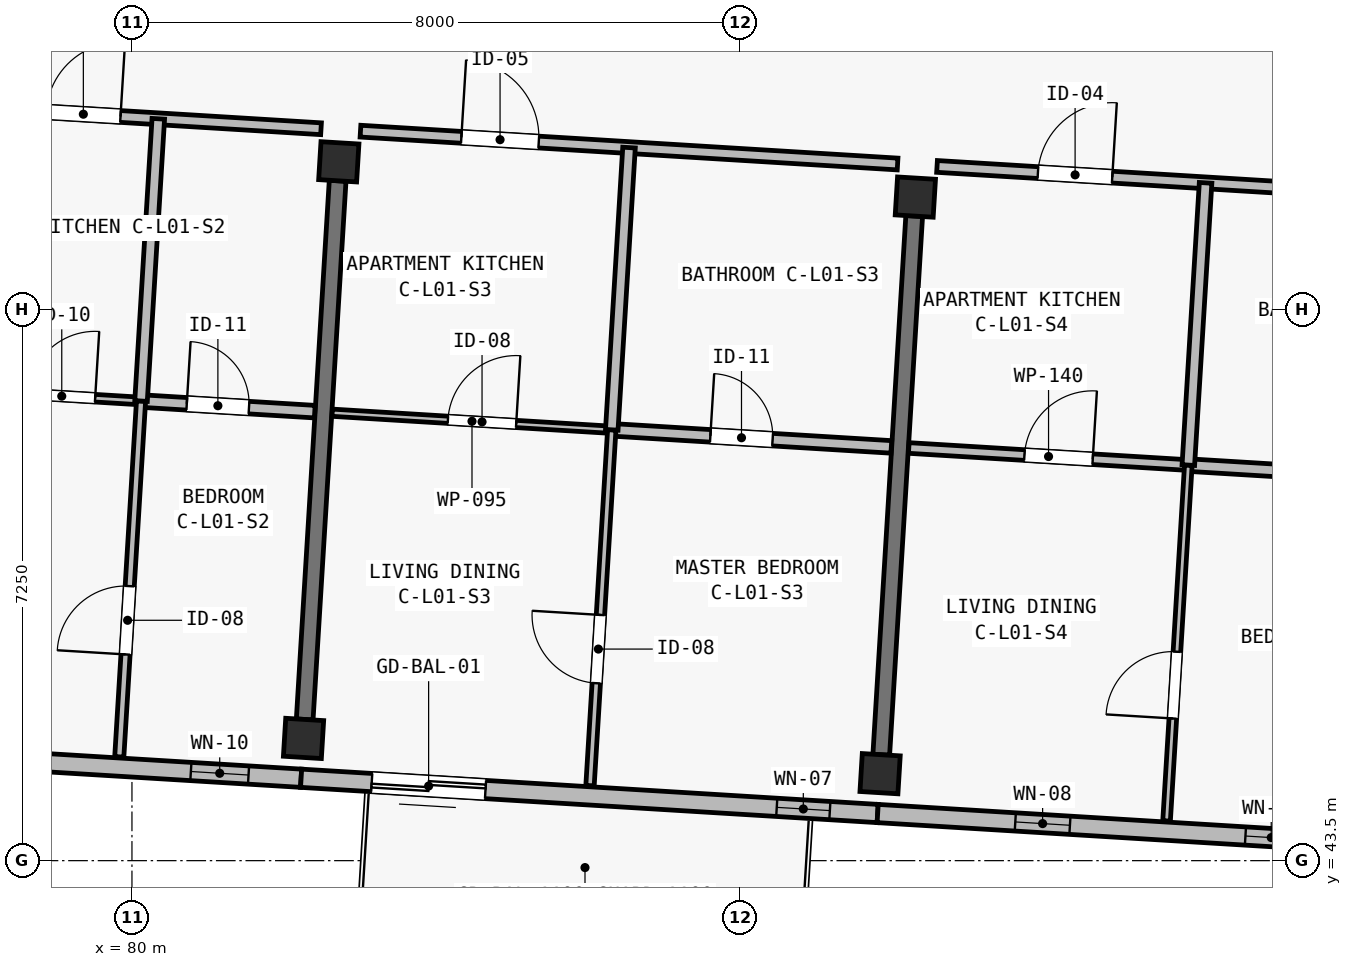
"""IFC4 building model, lengths in metres.
Left out: names, types, materials, properties, quantities, classifications, styles, units other than length and angle.
Written with IfcOpenShell. Run it as: python <this file> out.ifc"""

import sys

from ifc_helpers import new_model, si_unit, direction, frame, frame_2d, origin, origin_2d, place, context, subcontext, project, spatial, rectangle, extrude, element, fill, save


model = new_model("IFC4")
c1 = context("Model", 3, precision=1e-05, world=origin(), true_north=direction((0.0, 1.0)))
c2 = subcontext(c1, "Body", "Model", "MODEL_VIEW")
j1 = project(units=[si_unit("LENGTHUNIT", "METRE"), si_unit("PLANEANGLEUNIT", "RADIAN")], contexts=[c1])
p1 = place(None, origin())
s1 = spatial("IfcSite", under=j1, at=p1, CompositionType="ELEMENT")
p2 = place(p1, origin())
s2 = spatial("IfcBuilding", under=s1, at=p2, CompositionType="ELEMENT")
p3 = place(p2, frame((0.0, 0.0, 4.5)))
s3 = spatial("IfcBuildingStorey", under=s2, at=p3, CompositionType="ELEMENT", Elevation=4.5)
for number, where, z_axis, x_axis in (
    (1, (82.258, 45.108, 0.0), (0.0, 0.0, 1.0), (0.998, -0.061, 0.0)),
    (2, (82.721, 52.694, 0.0), (0.0, 0.0, 1.0), (0.998, -0.061, 0.0)),
    (3, (89.843, 44.644, 0.0), (0.0, 0.0, 1.0), (0.998, -0.061, 0.0)),
    (4, (90.307, 52.23, 0.0), (0.0, 0.0, 1.0), (0.998, -0.061, 0.0)),
):
    element("IfcColumn", number, at=place(p3, frame(where, z_axis=z_axis, x_axis=x_axis)), inside=s3, PredefinedType="COLUMN", context=c2, shape_type="SweptSolid", body=[
        extrude(rectangle(XDim=0.5, YDim=0.5, at=origin_2d()), origin(), (0.0, 0.0, 1.0), 3.9),
    ])
p4 = place(p3, frame((82.273, 45.358, -0.25), z_axis=(0.0, 0.0, 1.0), x_axis=(0.061070212127, 0.998133472633, 0.0)))
e5 = element("IfcWall", 5, at=p4, inside=s3, PredefinedType="SHEAR", context=c2, shape_type="SweptSolid", body=[
    extrude(rectangle(XDim=7.1, YDim=0.22, at=frame_2d((3.55, 0.0))), origin(), (0.0, 0.0, 1.0), 3.4),
])
p5 = place(p3, frame((89.859, 44.894, -0.25), z_axis=(0.0, 0.0, 1.0), x_axis=(0.061033859059, 0.99813569621, 0.0)))
e6 = element("IfcWall", 6, at=p5, inside=s3, PredefinedType="SHEAR", context=c2, shape_type="SweptSolid", body=[
    extrude(rectangle(XDim=7.1, YDim=0.22, at=frame_2d((3.55, 0.0))), origin(), (0.0, 0.0, 1.0), 3.4),
])
p6 = place(p3, frame((82.225, 44.584, 0.0), z_axis=(0.0, 0.0, 1.0), x_axis=(-0.998133591969, 0.061068261669, 0.0)))
e7 = element("IfcWall", 7, at=p6, inside=s3, PredefinedType="SOLIDWALL", context=c2, shape_type="SweptSolid", body=[
    extrude(rectangle(XDim=7.6, YDim=0.24, at=frame_2d((3.8, 0.0))), origin(), (0.0, 0.0, 1.0), 3.65),
])
p7 = place(p6, frame((0.693, 0.0, 0.42)))
e8 = element("IfcOpeningElement", 8, at=p7, cuts=e7, PredefinedType="OPENING", context=c2, shape_type="SweptSolid", body=[
    extrude(rectangle(XDim=0.76, YDim=2.34, at=frame_2d((0.38, 1.17))), frame((0.0, 0.135, 0.0), z_axis=(0.0, -1.0, 0.0), x_axis=(1.0, 0.0, 0.0)), (0.0, 0.0, 1.0), 0.27),
])
p8 = place(p6, frame((3.476, 0.0, 0.42)))
e9 = element("IfcOpeningElement", 9, at=p8, cuts=e7, PredefinedType="OPENING", context=c2, shape_type="SweptSolid", body=[
    extrude(rectangle(XDim=0.82, YDim=2.18, at=frame_2d((0.41, 1.09))), frame((0.0, 0.135, 0.0), z_axis=(0.0, -1.0, 0.0), x_axis=(1.0, 0.0, 0.0)), (0.0, 0.0, 1.0), 0.27),
])
p9 = place(p3, frame((89.811, 44.12, 0.0), z_axis=(0.0, 0.0, 1.0), x_axis=(-0.998135669243, 0.061034300063, 0.0)))
e10 = element("IfcWall", 10, at=p9, inside=s3, PredefinedType="SOLIDWALL", context=c2, shape_type="SweptSolid", body=[
    extrude(rectangle(XDim=7.6, YDim=0.24, at=frame_2d((3.8, 0.0))), origin(), (0.0, 0.0, 1.0), 3.65),
])
p10 = place(p9, frame((5.169, 0.0, 0.0)))
e11 = element("IfcOpeningElement", 11, at=p10, cuts=e10, PredefinedType="OPENING", context=c2, shape_type="SweptSolid", body=[
    extrude(rectangle(XDim=1.5, YDim=2.12, at=frame_2d((0.75, 1.06))), frame((0.0, 0.135, 0.0), z_axis=(0.0, -1.0, 0.0), x_axis=(1.0, 0.0, 0.0)), (0.0, 0.0, 1.0), 0.27),
])
p11 = place(p9, frame((0.63, 0.0, 0.46)))
e12 = element("IfcOpeningElement", 12, at=p11, cuts=e10, PredefinedType="OPENING", context=c2, shape_type="SweptSolid", body=[
    extrude(rectangle(XDim=0.7, YDim=2.36, at=frame_2d((0.35, 1.18))), frame((0.0, 0.135, 0.0), z_axis=(0.0, -1.0, 0.0), x_axis=(1.0, 0.0, 0.0)), (0.0, 0.0, 1.0), 0.27),
])
p12 = place(p3, frame((97.397, 43.656, 0.0), z_axis=(0.0, 0.0, 1.0), x_axis=(-0.998135549572, 0.061036257095, 0.0)))
e13 = element("IfcWall", 13, at=p12, inside=s3, PredefinedType="SOLIDWALL", context=c2, shape_type="SweptSolid", body=[
    extrude(rectangle(XDim=7.6, YDim=0.24, at=frame_2d((3.8, 0.0))), origin(), (0.0, 0.0, 1.0), 3.65),
])
p13 = place(p12, frame((0.61, 0.0, 0.52)))
e14 = element("IfcOpeningElement", 14, at=p13, cuts=e13, PredefinedType="OPENING", context=c2, shape_type="SweptSolid", body=[
    extrude(rectangle(XDim=0.66, YDim=2.32, at=frame_2d((0.33, 1.16))), frame((0.0, 0.135, 0.0), z_axis=(0.0, -1.0, 0.0), x_axis=(1.0, 0.0, 0.0)), (0.0, 0.0, 1.0), 0.27),
])
p14 = place(p12, frame((2.072, 0.0, 0.42)))
e15 = element("IfcOpeningElement", 15, at=p14, cuts=e13, PredefinedType="OPENING", context=c2, shape_type="SweptSolid", body=[
    extrude(rectangle(XDim=0.68, YDim=2.24, at=frame_2d((0.34, 1.12))), frame((0.0, 0.135, 0.0), z_axis=(0.0, -1.0, 0.0), x_axis=(1.0, 0.0, 0.0)), (0.0, 0.0, 1.0), 0.27),
])
p15 = place(p12, frame((5.066, 0.0, 0.52)))
e16 = element("IfcOpeningElement", 16, at=p15, cuts=e13, PredefinedType="OPENING", context=c2, shape_type="SweptSolid", body=[
    extrude(rectangle(XDim=0.72, YDim=2.16, at=frame_2d((0.36, 1.08))), frame((0.0, 0.135, 0.0), z_axis=(0.0, -1.0, 0.0), x_axis=(1.0, 0.0, 0.0)), (0.0, 0.0, 1.0), 0.27),
])
p16 = place(p3, frame((78.415, 53.378, 0.0), z_axis=(0.0, 0.0, 1.0), x_axis=(0.998131852862, -0.061096679962, 0.0)))
e17 = element("IfcWall", 17, at=p16, inside=s3, PredefinedType="PARTITIONING", context=c2, shape_type="SweptSolid", body=[
    extrude(rectangle(XDim=4.08, YDim=0.155, at=frame_2d((2.04, 0.0))), origin(), (0.0, 0.0, 1.0), 3.62),
])
p17 = place(p16, frame((0.457, 0.0, 0.0)))
e18 = element("IfcOpeningElement", 18, at=p17, cuts=e17, PredefinedType="OPENING", context=c2, shape_type="SweptSolid", body=[
    extrude(rectangle(XDim=0.98, YDim=2.15, at=frame_2d((0.49, 1.075))), frame((0.0, 0.093, 0.0), z_axis=(0.0, -1.0, 0.0), x_axis=(1.0, 0.0, 0.0)), (0.0, 0.0, 1.0), 0.185),
])
p18 = place(p3, frame((75.049, 49.857, 0.0), z_axis=(0.0, 0.0, 1.0), x_axis=(0.998135637207, -0.061034823981, 0.0)))
e19 = element("IfcWall", 19, at=p18, inside=s3, PredefinedType="PARTITIONING", context=c2, shape_type="SweptSolid", body=[
    extrude(rectangle(XDim=5.08, YDim=0.1, at=frame_2d((2.54, 0.0))), origin(), (0.0, 0.0, 1.0), 3.62),
])
p19 = place(p18, frame((3.595, 0.0, 0.0)))
e20 = element("IfcOpeningElement", 20, at=p19, cuts=e19, PredefinedType="OPENING", context=c2, shape_type="SweptSolid", body=[
    extrude(rectangle(XDim=0.88, YDim=2.1, at=frame_2d((0.44, 1.05))), frame((0.0, 0.065, 0.0), z_axis=(0.0, -1.0, 0.0), x_axis=(1.0, 0.0, 0.0)), (0.0, 0.0, 1.0), 0.13),
])
p20 = place(p3, frame((80.119, 49.547, 0.0), z_axis=(0.0, 0.0, 1.0), x_axis=(0.99813262565, -0.061084053668, 0.0)))
e21 = element("IfcWall", 21, at=p20, inside=s3, PredefinedType="PLUMBINGWALL", context=c2, shape_type="SweptSolid", body=[
    extrude(rectangle(XDim=2.29, YDim=0.165, at=frame_2d((1.145, 0.0))), origin(), (0.0, 0.0, 1.0), 3.62),
])
p21 = place(p20, frame((0.603, 0.0, 0.0)))
e22 = element("IfcOpeningElement", 22, at=p21, cuts=e21, PredefinedType="OPENING", context=c2, shape_type="SweptSolid", body=[
    extrude(rectangle(XDim=0.82, YDim=2.08, at=frame_2d((0.41, 1.04))), frame((0.0, 0.097, 0.0), z_axis=(0.0, -1.0, 0.0), x_axis=(1.0, 0.0, 0.0)), (0.0, 0.0, 1.0), 0.195),
])
p22 = place(p3, frame((79.833, 44.866, 0.0), z_axis=(0.0, 0.0, 1.0), x_axis=(0.061010571843, 0.998137119901, 0.0)))
e23 = element("IfcWall", 23, at=p22, inside=s3, PredefinedType="PARTITIONING", context=c2, shape_type="SweptSolid", body=[
    extrude(rectangle(XDim=4.69, YDim=0.12, at=frame_2d((2.345, 0.0))), origin(), (0.0, 0.0, 1.0), 3.62),
])
p23 = place(p22, frame((1.35, 0.0, 0.0)))
e24 = element("IfcOpeningElement", 24, at=p23, cuts=e23, PredefinedType="OPENING", context=c2, shape_type="SweptSolid", body=[
    extrude(rectangle(XDim=0.9, YDim=2.1, at=frame_2d((0.45, 1.05))), frame((0.0, 0.075, 0.0), z_axis=(0.0, -1.0, 0.0), x_axis=(1.0, 0.0, 0.0)), (0.0, 0.0, 1.0), 0.15),
])
p24 = place(p3, frame((80.119, 49.547, 0.0), z_axis=(0.0, 0.0, 1.0), x_axis=(0.061099388563, 0.998131687062, 0.0)))
e25 = element("IfcWall", 25, at=p24, inside=s3, PredefinedType="PLUMBINGWALL", context=c2, shape_type="SweptSolid", body=[
    extrude(rectangle(XDim=3.72, YDim=0.165, at=frame_2d((1.86, 0.0))), origin(), (0.0, 0.0, 1.0), 3.62),
])
p25 = place(p3, frame((83.007, 53.097, 0.0), z_axis=(0.0, 0.0, 1.0), x_axis=(0.998135666539, -0.061034344288, 0.0)))
e26 = element("IfcWall", 26, at=p25, inside=s3, PredefinedType="PARTITIONING", context=c2, shape_type="SweptSolid", body=[
    extrude(rectangle(XDim=7.08, YDim=0.155, at=frame_2d((3.54, 0.0))), origin(), (0.0, 0.0, 1.0), 3.62),
])
p26 = place(p25, frame((1.33, 0.0, 0.0)))
e27 = element("IfcOpeningElement", 27, at=p26, cuts=e26, PredefinedType="OPENING", context=c2, shape_type="SweptSolid", body=[
    extrude(rectangle(XDim=1.02, YDim=2.2, at=frame_2d((0.51, 1.1))), frame((0.0, 0.093, 0.0), z_axis=(0.0, -1.0, 0.0), x_axis=(1.0, 0.0, 0.0)), (0.0, 0.0, 1.0), 0.185),
])
p27 = place(p3, frame((82.635, 49.393, 0.0), z_axis=(0.0, 0.0, 1.0), x_axis=(0.998132682596, -0.061083123148, 0.0)))
e28 = element("IfcWall", 28, at=p27, inside=s3, PredefinedType="PARTITIONING", context=c2, shape_type="SweptSolid", body=[
    extrude(rectangle(XDim=3.685, YDim=0.095, at=frame_2d((1.843, 0.0))), origin(), (0.0, 0.0, 1.0), 3.62),
])
p28 = place(p27, frame((1.525, 0.0, 0.0)))
e29 = element("IfcOpeningElement", 29, at=p28, cuts=e28, PredefinedType="OPENING", context=c2, shape_type="SweptSolid", body=[
    extrude(rectangle(XDim=0.9, YDim=2.1, at=frame_2d((0.45, 1.05))), frame((0.0, 0.062, 0.0), z_axis=(0.0, -1.0, 0.0), x_axis=(1.0, 0.0, 0.0)), (0.0, 0.0, 1.0), 0.125),
])
p29 = place(p3, frame((86.313, 49.168, 0.0), z_axis=(0.0, 0.0, 1.0), x_axis=(0.998136472989, -0.061021154439, 0.0)))
e30 = element("IfcWall", 30, at=p29, inside=s3, PredefinedType="PLUMBINGWALL", context=c2, shape_type="SweptSolid", body=[
    extrude(rectangle(XDim=3.685, YDim=0.165, at=frame_2d((1.842, 0.0))), origin(), (0.0, 0.0, 1.0), 3.62),
])
p30 = place(p29, frame((1.3, 0.0, 0.0)))
e31 = element("IfcOpeningElement", 31, at=p30, cuts=e30, PredefinedType="OPENING", context=c2, shape_type="SweptSolid", body=[
    extrude(rectangle(XDim=0.82, YDim=2.08, at=frame_2d((0.41, 1.04))), frame((0.0, 0.097, 0.0), z_axis=(0.0, -1.0, 0.0), x_axis=(1.0, 0.0, 0.0)), (0.0, 0.0, 1.0), 0.195),
])
p31 = place(p3, frame((86.027, 44.487, 0.0), z_axis=(0.0, 0.0, 1.0), x_axis=(0.061062434628, 0.998133948465, 0.0)))
e32 = element("IfcWall", 32, at=p31, inside=s3, PredefinedType="PARTITIONING", context=c2, shape_type="SweptSolid", body=[
    extrude(rectangle(XDim=4.69, YDim=0.11, at=frame_2d((2.345, 0.0))), origin(), (0.0, 0.0, 1.0), 3.62),
])
p32 = place(p31, frame((1.35, 0.0, 0.0)))
e33 = element("IfcOpeningElement", 33, at=p32, cuts=e32, PredefinedType="OPENING", context=c2, shape_type="SweptSolid", body=[
    extrude(rectangle(XDim=0.9, YDim=2.1, at=frame_2d((0.45, 1.05))), frame((0.0, 0.07, 0.0), z_axis=(0.0, -1.0, 0.0), x_axis=(1.0, 0.0, 0.0)), (0.0, 0.0, 1.0), 0.14),
])
p33 = place(p3, frame((86.313, 49.168, 0.0), z_axis=(0.0, 0.0, 1.0), x_axis=(0.061034005467, 0.998135687257, 0.0)))
e34 = element("IfcWall", 34, at=p33, inside=s3, PredefinedType="PLUMBINGWALL", context=c2, shape_type="SweptSolid", body=[
    extrude(rectangle(XDim=3.72, YDim=0.165, at=frame_2d((1.86, 0.0))), origin(), (0.0, 0.0, 1.0), 3.62),
])
p34 = place(p3, frame((90.593, 52.633, 0.0), z_axis=(0.0, 0.0, 1.0), x_axis=(0.998135538078, -0.061036445065, 0.0)))
e35 = element("IfcWall", 35, at=p34, inside=s3, PredefinedType="PARTITIONING", context=c2, shape_type="SweptSolid", body=[
    extrude(rectangle(XDim=7.08, YDim=0.155, at=frame_2d((3.54, 0.0))), origin(), (0.0, 0.0, 1.0), 3.62),
])
p35 = place(p34, frame((1.33, 0.0, 0.0)))
e36 = element("IfcOpeningElement", 36, at=p35, cuts=e35, PredefinedType="OPENING", context=c2, shape_type="SweptSolid", body=[
    extrude(rectangle(XDim=0.98, YDim=2.15, at=frame_2d((0.49, 1.075))), frame((0.0, 0.093, 0.0), z_axis=(0.0, -1.0, 0.0), x_axis=(1.0, 0.0, 0.0)), (0.0, 0.0, 1.0), 0.185),
])
p36 = place(p3, frame((90.221, 48.929, 0.0), z_axis=(0.0, 0.0, 1.0), x_axis=(0.99813243538, -0.061087162657, 0.0)))
e37 = element("IfcWall", 37, at=p36, inside=s3, PredefinedType="PARTITIONING", context=c2, shape_type="SweptSolid", body=[
    extrude(rectangle(XDim=3.685, YDim=0.14, at=frame_2d((1.842, 0.0))), origin(), (0.0, 0.0, 1.0), 3.62),
])
p37 = place(p36, frame((1.525, 0.0, 0.0)))
e38 = element("IfcOpeningElement", 38, at=p37, cuts=e37, PredefinedType="OPENING", context=c2, shape_type="SweptSolid", body=[
    extrude(rectangle(XDim=0.9, YDim=2.1, at=frame_2d((0.45, 1.05))), frame((0.0, 0.085, 0.0), z_axis=(0.0, -1.0, 0.0), x_axis=(1.0, 0.0, 0.0)), (0.0, 0.0, 1.0), 0.17),
])
p38 = place(p3, frame((93.899, 48.704, 0.0), z_axis=(0.0, 0.0, 1.0), x_axis=(0.998136719672, -0.061017119263, 0.0)))
e39 = element("IfcWall", 39, at=p38, inside=s3, PredefinedType="PLUMBINGWALL", context=c2, shape_type="SweptSolid", body=[
    extrude(rectangle(XDim=3.685, YDim=0.165, at=frame_2d((1.843, 0.0))), origin(), (0.0, 0.0, 1.0), 3.62),
])
p39 = place(p38, frame((1.3, 0.0, 0.0)))
e40 = element("IfcOpeningElement", 40, at=p39, cuts=e39, PredefinedType="OPENING", context=c2, shape_type="SweptSolid", body=[
    extrude(rectangle(XDim=0.82, YDim=2.08, at=frame_2d((0.41, 1.04))), frame((0.0, 0.097, 0.0), z_axis=(0.0, -1.0, 0.0), x_axis=(1.0, 0.0, 0.0)), (0.0, 0.0, 1.0), 0.195),
])
p40 = place(p3, frame((93.612, 44.023, 0.0), z_axis=(0.0, 0.0, 1.0), x_axis=(0.061062434628, 0.998133948465, 0.0)))
e41 = element("IfcWall", 41, at=p40, inside=s3, PredefinedType="PARTITIONING", context=c2, shape_type="SweptSolid", body=[
    extrude(rectangle(XDim=4.69, YDim=0.1, at=frame_2d((2.345, 0.0))), origin(), (0.0, 0.0, 1.0), 3.62),
])
p41 = place(p40, frame((1.35, 0.0, 0.0)))
e42 = element("IfcOpeningElement", 42, at=p41, cuts=e41, PredefinedType="OPENING", context=c2, shape_type="SweptSolid", body=[
    extrude(rectangle(XDim=0.88, YDim=2.1, at=frame_2d((0.44, 1.05))), frame((0.0, 0.065, 0.0), z_axis=(0.0, -1.0, 0.0), x_axis=(1.0, 0.0, 0.0)), (0.0, 0.0, 1.0), 0.13),
])
p42 = place(p3, frame((93.899, 48.704, 0.0), z_axis=(0.0, 0.0, 1.0), x_axis=(0.061034005467, 0.998135687257, 0.0)))
e43 = element("IfcWall", 43, at=p42, inside=s3, PredefinedType="PLUMBINGWALL", context=c2, shape_type="SweptSolid", body=[
    extrude(rectangle(XDim=3.72, YDim=0.165, at=frame_2d((1.86, 0.0))), origin(), (0.0, 0.0, 1.0), 3.62),
])
p43 = place(p7, origin())
e44 = element("IfcWindow", 44, at=p43, inside=s3, PartitioningType="SINGLE_PANEL", PredefinedType="WINDOW", context=c2, shape_type="SweptSolid", body=[
    extrude(rectangle(XDim=0.76, YDim=2.34, at=frame_2d((0.38, 1.17))), frame((0.0, 0.03, 0.0), z_axis=(0.0, -1.0, 0.0), x_axis=(1.0, 0.0, 0.0)), (0.0, 0.0, 1.0), 0.06),
])
fill(e8, e44)
p44 = place(p10, origin())
e45 = element("IfcDoor", 45, at=p44, inside=s3, OperationType="SLIDING_TO_RIGHT", PredefinedType="DOOR", context=c2, shape_type="SweptSolid", body=[
    extrude(rectangle(XDim=1.5, YDim=2.12, at=frame_2d((0.75, 1.06))), frame((0.0, 0.025, 0.0), z_axis=(0.0, -1.0, 0.0), x_axis=(1.0, 0.0, 0.0)), (0.0, 0.0, 1.0), 0.05),
])
fill(e11, e45)
p45 = place(p11, origin())
e46 = element("IfcWindow", 46, at=p45, inside=s3, PartitioningType="SINGLE_PANEL", PredefinedType="WINDOW", context=c2, shape_type="SweptSolid", body=[
    extrude(rectangle(XDim=0.7, YDim=2.36, at=frame_2d((0.35, 1.18))), frame((0.0, 0.03, 0.0), z_axis=(0.0, -1.0, 0.0), x_axis=(1.0, 0.0, 0.0)), (0.0, 0.0, 1.0), 0.06),
])
fill(e12, e46)
p46 = place(p14, origin())
e47 = element("IfcWindow", 47, at=p46, inside=s3, PartitioningType="SINGLE_PANEL", PredefinedType="WINDOW", context=c2, shape_type="SweptSolid", body=[
    extrude(rectangle(XDim=0.68, YDim=2.24, at=frame_2d((0.34, 1.12))), frame((0.0, 0.03, 0.0), z_axis=(0.0, -1.0, 0.0), x_axis=(1.0, 0.0, 0.0)), (0.0, 0.0, 1.0), 0.06),
])
fill(e15, e47)
p47 = place(p15, origin())
e48 = element("IfcWindow", 48, at=p47, inside=s3, PartitioningType="SINGLE_PANEL", PredefinedType="WINDOW", context=c2, shape_type="SweptSolid", body=[
    extrude(rectangle(XDim=0.72, YDim=2.16, at=frame_2d((0.36, 1.08))), frame((0.0, 0.03, 0.0), z_axis=(0.0, -1.0, 0.0), x_axis=(1.0, 0.0, 0.0)), (0.0, 0.0, 1.0), 0.06),
])
fill(e16, e48)
p48 = place(p17, origin())
e49 = element("IfcDoor", 49, at=p48, inside=s3, OperationType="SINGLE_SWING_RIGHT", PredefinedType="DOOR", context=c2, shape_type="SweptSolid", body=[
    extrude(rectangle(XDim=0.98, YDim=2.15, at=frame_2d((0.49, 1.075))), frame((0.0, 0.025, 0.0), z_axis=(0.0, -1.0, 0.0), x_axis=(1.0, 0.0, 0.0)), (0.0, 0.0, 1.0), 0.05),
])
fill(e18, e49)
p49 = place(p19, origin())
e50 = element("IfcDoor", 50, at=p49, inside=s3, OperationType="SINGLE_SWING_RIGHT", PredefinedType="DOOR", context=c2, shape_type="SweptSolid", body=[
    extrude(rectangle(XDim=0.88, YDim=2.1, at=frame_2d((0.44, 1.05))), frame((0.0, 0.025, 0.0), z_axis=(0.0, -1.0, 0.0), x_axis=(1.0, 0.0, 0.0)), (0.0, 0.0, 1.0), 0.05),
])
fill(e20, e50)
p50 = place(p21, origin())
e51 = element("IfcDoor", 51, at=p50, inside=s3, OperationType="SINGLE_SWING_LEFT", PredefinedType="DOOR", context=c2, shape_type="SweptSolid", body=[
    extrude(rectangle(XDim=0.82, YDim=2.08, at=frame_2d((0.41, 1.04))), frame((0.0, 0.025, 0.0), z_axis=(0.0, -1.0, 0.0), x_axis=(1.0, 0.0, 0.0)), (0.0, 0.0, 1.0), 0.05),
])
fill(e22, e51)
p51 = place(p23, origin())
e52 = element("IfcDoor", 52, at=p51, inside=s3, OperationType="SINGLE_SWING_LEFT", PredefinedType="DOOR", context=c2, shape_type="SweptSolid", body=[
    extrude(rectangle(XDim=0.9, YDim=2.1, at=frame_2d((0.45, 1.05))), frame((0.0, 0.025, 0.0), z_axis=(0.0, -1.0, 0.0), x_axis=(1.0, 0.0, 0.0)), (0.0, 0.0, 1.0), 0.05),
])
fill(e24, e52)
p52 = place(p26, origin())
e53 = element("IfcDoor", 53, at=p52, inside=s3, OperationType="SINGLE_SWING_LEFT", PredefinedType="DOOR", context=c2, shape_type="SweptSolid", body=[
    extrude(rectangle(XDim=1.02, YDim=2.2, at=frame_2d((0.51, 1.1))), frame((0.0, 0.025, 0.0), z_axis=(0.0, -1.0, 0.0), x_axis=(1.0, 0.0, 0.0)), (0.0, 0.0, 1.0), 0.05),
])
fill(e27, e53)
p53 = place(p28, origin())
e54 = element("IfcDoor", 54, at=p53, inside=s3, OperationType="SINGLE_SWING_RIGHT", PredefinedType="DOOR", context=c2, shape_type="SweptSolid", body=[
    extrude(rectangle(XDim=0.9, YDim=2.1, at=frame_2d((0.45, 1.05))), frame((0.0, 0.025, 0.0), z_axis=(0.0, -1.0, 0.0), x_axis=(1.0, 0.0, 0.0)), (0.0, 0.0, 1.0), 0.05),
])
fill(e29, e54)
p54 = place(p30, origin())
e55 = element("IfcDoor", 55, at=p54, inside=s3, OperationType="SINGLE_SWING_LEFT", PredefinedType="DOOR", context=c2, shape_type="SweptSolid", body=[
    extrude(rectangle(XDim=0.82, YDim=2.08, at=frame_2d((0.41, 1.04))), frame((0.0, 0.025, 0.0), z_axis=(0.0, -1.0, 0.0), x_axis=(1.0, 0.0, 0.0)), (0.0, 0.0, 1.0), 0.05),
])
fill(e31, e55)
p55 = place(p32, origin())
e56 = element("IfcDoor", 56, at=p55, inside=s3, OperationType="SINGLE_SWING_RIGHT", PredefinedType="DOOR", context=c2, shape_type="SweptSolid", body=[
    extrude(rectangle(XDim=0.9, YDim=2.1, at=frame_2d((0.45, 1.05))), frame((0.0, 0.025, 0.0), z_axis=(0.0, -1.0, 0.0), x_axis=(1.0, 0.0, 0.0)), (0.0, 0.0, 1.0), 0.05),
])
fill(e33, e56)
p56 = place(p35, origin())
e57 = element("IfcDoor", 57, at=p56, inside=s3, OperationType="SINGLE_SWING_RIGHT", PredefinedType="DOOR", context=c2, shape_type="SweptSolid", body=[
    extrude(rectangle(XDim=0.98, YDim=2.15, at=frame_2d((0.49, 1.075))), frame((0.0, 0.025, 0.0), z_axis=(0.0, -1.0, 0.0), x_axis=(1.0, 0.0, 0.0)), (0.0, 0.0, 1.0), 0.05),
])
fill(e36, e57)
p57 = place(p37, origin())
e58 = element("IfcDoor", 58, at=p57, inside=s3, OperationType="SINGLE_SWING_RIGHT", PredefinedType="DOOR", context=c2, shape_type="SweptSolid", body=[
    extrude(rectangle(XDim=0.9, YDim=2.1, at=frame_2d((0.45, 1.05))), frame((0.0, 0.025, 0.0), z_axis=(0.0, -1.0, 0.0), x_axis=(1.0, 0.0, 0.0)), (0.0, 0.0, 1.0), 0.05),
])
fill(e38, e58)
p58 = place(p41, origin())
e59 = element("IfcDoor", 59, at=p58, inside=s3, OperationType="SINGLE_SWING_LEFT", PredefinedType="DOOR", context=c2, shape_type="SweptSolid", body=[
    extrude(rectangle(XDim=0.88, YDim=2.1, at=frame_2d((0.44, 1.05))), frame((0.0, 0.025, 0.0), z_axis=(0.0, -1.0, 0.0), x_axis=(1.0, 0.0, 0.0)), (0.0, 0.0, 1.0), 0.05),
])
fill(e42, e59)
save(model, sys.argv[1])
